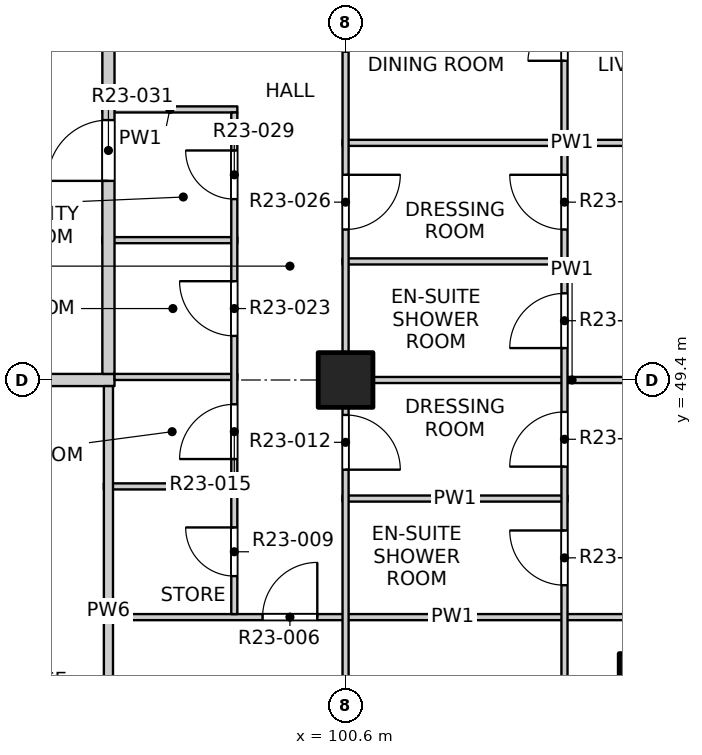
"""IFC4 building model, lengths in metres.
Left out: names, types, materials, properties, quantities, classifications, styles, units other than length and angle.
Written with IfcOpenShell. Run it as: python <this file> out.ifc"""

import sys

from ifc_helpers import new_model, si_unit, direction, frame, frame_2d, origin, origin_2d, place, context, subcontext, project, spatial, rectangle, extrude, element, fill, save


model = new_model("IFC4")
c1 = context("Model", 3, precision=1e-05, world=origin(), true_north=direction((0.0, 1.0)))
c2 = subcontext(c1, "Body", "Model", "MODEL_VIEW")
j1 = project(units=[si_unit("LENGTHUNIT", "METRE"), si_unit("PLANEANGLEUNIT", "RADIAN")], contexts=[c1])
p1 = place(None, origin())
s1 = spatial("IfcSite", under=j1, at=p1, CompositionType="ELEMENT")
p2 = place(p1, origin())
s2 = spatial("IfcBuilding", under=s1, at=p2, CompositionType="ELEMENT")
p3 = place(p2, frame((0.0, 0.0, 238.1)))
s3 = spatial("IfcBuildingStorey", under=s2, at=p3, CompositionType="ELEMENT", Elevation=238.1)
p4 = place(p3, frame((105.5, 44.5, -0.25), z_axis=(0.0, 0.0, 1.0), x_axis=(1.0, 0.0, 0.0)))
e1 = element("IfcColumn", 1, at=p4, inside=s3, PredefinedType="COLUMN", context=c2, shape_type="SweptSolid", body=[
    extrude(rectangle(XDim=0.8, YDim=0.8, at=origin_2d()), origin(), (0.0, 0.0, 1.0), 3.35),
])
p5 = place(p3, frame((100.6, 49.4, -0.25), z_axis=(0.0, 0.0, 1.0), x_axis=(1.0, 0.0, 0.0)))
e2 = element("IfcColumn", 2, at=p5, inside=s3, PredefinedType="COLUMN", context=c2, shape_type="SweptSolid", body=[
    extrude(rectangle(XDim=0.9, YDim=0.9, at=origin_2d()), origin(), (0.0, 0.0, 1.0), 3.35),
])
p6 = place(p3, frame((96.625, 45.5, 0.0), z_axis=(0.0, 0.0, 1.0), x_axis=(1.0, 0.0, 0.0)))
e3 = element("IfcWall", 3, at=p6, inside=s3, PredefinedType="PARTITIONING", context=c2, shape_type="SweptSolid", body=[
    extrude(rectangle(XDim=11.475, YDim=0.1, at=frame_2d((5.738, 0.0))), origin(), (0.0, 0.0, 1.0), 3.1),
])
p7 = place(p6, frame((2.61, 0.0, 0.0)))
e4 = element("IfcOpeningElement", 4, at=p7, cuts=e3, PredefinedType="OPENING", context=c2, shape_type="SweptSolid", body=[
    extrude(rectangle(XDim=0.9, YDim=2.1, at=frame_2d((0.45, 1.05))), frame((0.0, 0.06, 0.0), z_axis=(0.0, -1.0, 0.0), x_axis=(1.0, 0.0, 0.0)), (0.0, 0.0, 1.0), 0.12),
])
p8 = place(p3, frame((100.55, 47.45, 0.0), z_axis=(0.0, 0.0, 1.0), x_axis=(1.0, 0.0, 0.0)))
e5 = element("IfcWall", 5, at=p8, inside=s3, PredefinedType="PARTITIONING", context=c2, shape_type="SweptSolid", body=[
    extrude(rectangle(XDim=3.7, YDim=0.1, at=frame_2d((1.85, 0.0))), origin(), (0.0, 0.0, 1.0), 3.1),
])
p9 = place(p3, frame((96.625, 47.65, 0.0), z_axis=(0.0, 0.0, 1.0), x_axis=(1.0, 0.0, 0.0)))
e6 = element("IfcWall", 6, at=p9, inside=s3, PredefinedType="PARTITIONING", context=c2, shape_type="SweptSolid", body=[
    extrude(rectangle(XDim=2.195, YDim=0.1, at=frame_2d((1.098, 0.0))), origin(), (0.0, 0.0, 1.0), 3.1),
])
p10 = place(p3, frame((73.2, 49.4, 0.0), z_axis=(0.0, 0.0, 1.0), x_axis=(1.0, 0.0, 0.0)))
e7 = element("IfcWall", 7, at=p10, inside=s3, PredefinedType="PARTITIONING", context=c2, shape_type="SweptSolid", body=[
    extrude(rectangle(XDim=23.6, YDim=0.2, at=frame_2d((11.8, 0.0))), origin(), (0.0, 0.0, 1.0), 3.1),
])
p11 = place(p10, frame((2.25, 0.0, 0.0)))
e8 = element("IfcOpeningElement", 8, at=p11, cuts=e7, PredefinedType="OPENING", context=c2, shape_type="SweptSolid", body=[
    extrude(rectangle(XDim=1.2, YDim=2.1, at=frame_2d((0.6, 1.05))), frame((0.0, 0.11, 0.0), z_axis=(0.0, -1.0, 0.0), x_axis=(1.0, 0.0, 0.0)), (0.0, 0.0, 1.0), 0.22),
])
p12 = place(p10, frame((9.4, 0.0, 0.0)))
e9 = element("IfcOpeningElement", 9, at=p12, cuts=e7, PredefinedType="OPENING", context=c2, shape_type="SweptSolid", body=[
    extrude(rectangle(XDim=0.9, YDim=2.1, at=frame_2d((0.45, 1.05))), frame((0.0, 0.11, 0.0), z_axis=(0.0, -1.0, 0.0), x_axis=(1.0, 0.0, 0.0)), (0.0, 0.0, 1.0), 0.22),
])
p13 = place(p10, frame((15.1, 0.0, 0.0)))
e10 = element("IfcOpeningElement", 10, at=p13, cuts=e7, PredefinedType="OPENING", context=c2, shape_type="SweptSolid", body=[
    extrude(rectangle(XDim=1.2, YDim=2.1, at=frame_2d((0.6, 1.05))), frame((0.0, 0.11, 0.0), z_axis=(0.0, -1.0, 0.0), x_axis=(1.0, 0.0, 0.0)), (0.0, 0.0, 1.0), 0.22),
])
p14 = place(p10, frame((21.1, 0.0, 0.0)))
e11 = element("IfcOpeningElement", 11, at=p14, cuts=e7, PredefinedType="OPENING", context=c2, shape_type="SweptSolid", body=[
    extrude(rectangle(XDim=0.9, YDim=2.1, at=frame_2d((0.45, 1.05))), frame((0.0, 0.11, 0.0), z_axis=(0.0, -1.0, 0.0), x_axis=(1.0, 0.0, 0.0)), (0.0, 0.0, 1.0), 0.22),
])
p15 = place(p3, frame((100.55, 49.4, 0.0), z_axis=(0.0, 0.0, 1.0), x_axis=(1.0, 0.0, 0.0)))
e12 = element("IfcWall", 12, at=p15, inside=s3, PredefinedType="PARTITIONING", context=c2, shape_type="SweptSolid", body=[
    extrude(rectangle(XDim=7.55, YDim=0.1, at=frame_2d((3.775, 0.0))), origin(), (0.0, 0.0, 1.0), 3.1),
])
p16 = place(p3, frame((96.8, 49.45, 0.0), z_axis=(0.0, 0.0, 1.0), x_axis=(1.0, 0.0, 0.0)))
e13 = element("IfcWall", 13, at=p16, inside=s3, PredefinedType="PARTITIONING", context=c2, shape_type="SweptSolid", body=[
    extrude(rectangle(XDim=2.02, YDim=0.1, at=frame_2d((1.01, 0.0))), origin(), (0.0, 0.0, 1.0), 3.1),
])
p17 = place(p3, frame((100.55, 51.35, 0.0), z_axis=(0.0, 0.0, 1.0), x_axis=(1.0, 0.0, 0.0)))
e14 = element("IfcWall", 14, at=p17, inside=s3, PredefinedType="PARTITIONING", context=c2, shape_type="SweptSolid", body=[
    extrude(rectangle(XDim=3.7, YDim=0.1, at=frame_2d((1.85, 0.0))), origin(), (0.0, 0.0, 1.0), 3.1),
])
p18 = place(p3, frame((96.6, 51.7, 0.0), z_axis=(0.0, 0.0, 1.0), x_axis=(1.0, 0.0, 0.0)))
e15 = element("IfcWall", 15, at=p18, inside=s3, PredefinedType="PARTITIONING", context=c2, shape_type="SweptSolid", body=[
    extrude(rectangle(XDim=2.22, YDim=0.1, at=frame_2d((1.11, 0.0))), origin(), (0.0, 0.0, 1.0), 3.1),
])
p19 = place(p3, frame((100.55, 53.3, 0.0), z_axis=(0.0, 0.0, 1.0), x_axis=(1.0, 0.0, 0.0)))
e16 = element("IfcWall", 16, at=p19, inside=s3, PredefinedType="PARTITIONING", context=c2, shape_type="SweptSolid", body=[
    extrude(rectangle(XDim=7.55, YDim=0.1, at=frame_2d((3.775, 0.0))), origin(), (0.0, 0.0, 1.0), 3.1),
])
p20 = place(p3, frame((96.6, 53.85, 0.0), z_axis=(0.0, 0.0, 1.0), x_axis=(1.0, 0.0, 0.0)))
e17 = element("IfcWall", 17, at=p20, inside=s3, PredefinedType="PARTITIONING", context=c2, shape_type="SweptSolid", body=[
    extrude(rectangle(XDim=2.22, YDim=0.1, at=frame_2d((1.11, 0.0))), origin(), (0.0, 0.0, 1.0), 3.1),
])
p21 = place(p3, frame((96.7, 41.9, 0.0), z_axis=(0.0, 0.0, 1.0), x_axis=(0.0, 1.0, 0.0)))
e18 = element("IfcWall", 18, at=p21, inside=s3, PredefinedType="PARTITIONING", context=c2, shape_type="SweptSolid", body=[
    extrude(rectangle(XDim=7.4, YDim=0.15, at=frame_2d((3.7, 0.0))), origin(), (0.0, 0.0, 1.0), 3.1),
])
p22 = place(p3, frame((96.7, 49.5, 0.0), z_axis=(0.0, 0.0, 1.0), x_axis=(0.0, 1.0, 0.0)))
e19 = element("IfcWall", 19, at=p22, inside=s3, PredefinedType="PARTITIONING", context=c2, shape_type="SweptSolid", body=[
    extrude(rectangle(XDim=34.9, YDim=0.2, at=frame_2d((17.45, 0.0))), origin(), (0.0, 0.0, 1.0), 3.1),
])
p23 = place(p22, frame((3.175, 0.0, 0.0)))
e20 = element("IfcOpeningElement", 20, at=p23, cuts=e19, PredefinedType="OPENING", context=c2, shape_type="SweptSolid", body=[
    extrude(rectangle(XDim=1.0, YDim=2.1, at=frame_2d((0.5, 1.05))), frame((0.0, 0.11, 0.0), z_axis=(0.0, -1.0, 0.0), x_axis=(1.0, 0.0, 0.0)), (0.0, 0.0, 1.0), 0.22),
])
p24 = place(p22, frame((14.625, 0.0, 0.0)))
e21 = element("IfcOpeningElement", 21, at=p24, cuts=e19, PredefinedType="OPENING", context=c2, shape_type="SweptSolid", body=[
    extrude(rectangle(XDim=1.0, YDim=2.1, at=frame_2d((0.5, 1.05))), frame((0.0, 0.11, 0.0), z_axis=(0.0, -1.0, 0.0), x_axis=(1.0, 0.0, 0.0)), (0.0, 0.0, 1.0), 0.22),
])
p25 = place(p22, frame((30.175, 0.0, 0.0)))
e22 = element("IfcOpeningElement", 22, at=p25, cuts=e19, PredefinedType="OPENING", context=c2, shape_type="SweptSolid", body=[
    extrude(rectangle(XDim=1.0, YDim=2.1, at=frame_2d((0.5, 1.05))), frame((0.0, 0.11, 0.0), z_axis=(0.0, -1.0, 0.0), x_axis=(1.0, 0.0, 0.0)), (0.0, 0.0, 1.0), 0.22),
])
p26 = place(p3, frame((98.77, 45.55, 0.0), z_axis=(0.0, 0.0, 1.0), x_axis=(0.0, 1.0, 0.0)))
e23 = element("IfcWall", 23, at=p26, inside=s3, PredefinedType="PARTITIONING", context=c2, shape_type="SweptSolid", body=[
    extrude(rectangle(XDim=8.25, YDim=0.1, at=frame_2d((4.125, 0.0))), origin(), (0.0, 0.0, 1.0), 3.1),
])
p27 = place(p26, frame((0.625, 0.0, 0.0)))
e24 = element("IfcOpeningElement", 24, at=p27, cuts=e23, PredefinedType="OPENING", context=c2, shape_type="SweptSolid", body=[
    extrude(rectangle(XDim=0.8, YDim=2.1, at=frame_2d((0.4, 1.05))), frame((0.0, 0.06, 0.0), z_axis=(0.0, -1.0, 0.0), x_axis=(1.0, 0.0, 0.0)), (0.0, 0.0, 1.0), 0.12),
])
p28 = place(p26, frame((2.55, 0.0, 0.0)))
e25 = element("IfcOpeningElement", 25, at=p28, cuts=e23, PredefinedType="OPENING", context=c2, shape_type="SweptSolid", body=[
    extrude(rectangle(XDim=0.9, YDim=2.1, at=frame_2d((0.45, 1.05))), frame((0.0, 0.06, 0.0), z_axis=(0.0, -1.0, 0.0), x_axis=(1.0, 0.0, 0.0)), (0.0, 0.0, 1.0), 0.12),
])
p29 = place(p26, frame((4.575, 0.0, 0.0)))
e26 = element("IfcOpeningElement", 26, at=p29, cuts=e23, PredefinedType="OPENING", context=c2, shape_type="SweptSolid", body=[
    extrude(rectangle(XDim=0.9, YDim=2.1, at=frame_2d((0.45, 1.05))), frame((0.0, 0.06, 0.0), z_axis=(0.0, -1.0, 0.0), x_axis=(1.0, 0.0, 0.0)), (0.0, 0.0, 1.0), 0.12),
])
p30 = place(p26, frame((6.825, 0.0, 0.0)))
e27 = element("IfcOpeningElement", 27, at=p30, cuts=e23, PredefinedType="OPENING", context=c2, shape_type="SweptSolid", body=[
    extrude(rectangle(XDim=0.8, YDim=2.1, at=frame_2d((0.4, 1.05))), frame((0.0, 0.06, 0.0), z_axis=(0.0, -1.0, 0.0), x_axis=(1.0, 0.0, 0.0)), (0.0, 0.0, 1.0), 0.12),
])
p31 = place(p3, frame((100.6, 41.9, 0.0), z_axis=(0.0, 0.0, 1.0), x_axis=(0.0, 1.0, 0.0)))
e28 = element("IfcWall", 28, at=p31, inside=s3, PredefinedType="PARTITIONING", context=c2, shape_type="SweptSolid", body=[
    extrude(rectangle(XDim=46.2, YDim=0.1, at=frame_2d((23.1, 0.0))), origin(), (0.0, 0.0, 1.0), 3.1),
])
p32 = place(p31, frame((1.2, 0.0, 0.0)))
e29 = element("IfcOpeningElement", 29, at=p32, cuts=e28, PredefinedType="OPENING", context=c2, shape_type="SweptSolid", body=[
    extrude(rectangle(XDim=0.9, YDim=2.1, at=frame_2d((0.45, 1.05))), frame((0.0, 0.06, 0.0), z_axis=(0.0, -1.0, 0.0), x_axis=(1.0, 0.0, 0.0)), (0.0, 0.0, 1.0), 0.12),
])
p33 = place(p31, frame((6.025, 0.0, 0.0)))
e30 = element("IfcOpeningElement", 30, at=p33, cuts=e28, PredefinedType="OPENING", context=c2, shape_type="SweptSolid", body=[
    extrude(rectangle(XDim=0.9, YDim=2.1, at=frame_2d((0.45, 1.05))), frame((0.0, 0.06, 0.0), z_axis=(0.0, -1.0, 0.0), x_axis=(1.0, 0.0, 0.0)), (0.0, 0.0, 1.0), 0.12),
])
p34 = place(p31, frame((9.975, 0.0, 0.0)))
e31 = element("IfcOpeningElement", 31, at=p34, cuts=e28, PredefinedType="OPENING", context=c2, shape_type="SweptSolid", body=[
    extrude(rectangle(XDim=0.9, YDim=2.1, at=frame_2d((0.45, 1.05))), frame((0.0, 0.06, 0.0), z_axis=(0.0, -1.0, 0.0), x_axis=(1.0, 0.0, 0.0)), (0.0, 0.0, 1.0), 0.12),
])
p35 = place(p31, frame((12.9, 0.0, 0.0)))
e32 = element("IfcOpeningElement", 32, at=p35, cuts=e28, PredefinedType="OPENING", context=c2, shape_type="SweptSolid", body=[
    extrude(rectangle(XDim=0.9, YDim=2.1, at=frame_2d((0.45, 1.05))), frame((0.0, 0.06, 0.0), z_axis=(0.0, -1.0, 0.0), x_axis=(1.0, 0.0, 0.0)), (0.0, 0.0, 1.0), 0.12),
])
p36 = place(p31, frame((17.775, 0.0, 0.0)))
e33 = element("IfcOpeningElement", 33, at=p36, cuts=e28, PredefinedType="OPENING", context=c2, shape_type="SweptSolid", body=[
    extrude(rectangle(XDim=0.9, YDim=2.1, at=frame_2d((0.45, 1.05))), frame((0.0, 0.06, 0.0), z_axis=(0.0, -1.0, 0.0), x_axis=(1.0, 0.0, 0.0)), (0.0, 0.0, 1.0), 0.12),
])
p37 = place(p31, frame((21.625, 0.0, 0.0)))
e34 = element("IfcOpeningElement", 34, at=p37, cuts=e28, PredefinedType="OPENING", context=c2, shape_type="SweptSolid", body=[
    extrude(rectangle(XDim=0.9, YDim=2.1, at=frame_2d((0.45, 1.05))), frame((0.0, 0.06, 0.0), z_axis=(0.0, -1.0, 0.0), x_axis=(1.0, 0.0, 0.0)), (0.0, 0.0, 1.0), 0.12),
])
p38 = place(p31, frame((25.575, 0.0, 0.0)))
e35 = element("IfcOpeningElement", 35, at=p38, cuts=e28, PredefinedType="OPENING", context=c2, shape_type="SweptSolid", body=[
    extrude(rectangle(XDim=0.9, YDim=2.1, at=frame_2d((0.45, 1.05))), frame((0.0, 0.06, 0.0), z_axis=(0.0, -1.0, 0.0), x_axis=(1.0, 0.0, 0.0)), (0.0, 0.0, 1.0), 0.12),
])
p39 = place(p31, frame((28.5, 0.0, 0.0)))
e36 = element("IfcOpeningElement", 36, at=p39, cuts=e28, PredefinedType="OPENING", context=c2, shape_type="SweptSolid", body=[
    extrude(rectangle(XDim=0.9, YDim=2.1, at=frame_2d((0.45, 1.05))), frame((0.0, 0.06, 0.0), z_axis=(0.0, -1.0, 0.0), x_axis=(1.0, 0.0, 0.0)), (0.0, 0.0, 1.0), 0.12),
])
p40 = place(p31, frame((33.375, 0.0, 0.0)))
e37 = element("IfcOpeningElement", 37, at=p40, cuts=e28, PredefinedType="OPENING", context=c2, shape_type="SweptSolid", body=[
    extrude(rectangle(XDim=0.9, YDim=2.1, at=frame_2d((0.45, 1.05))), frame((0.0, 0.06, 0.0), z_axis=(0.0, -1.0, 0.0), x_axis=(1.0, 0.0, 0.0)), (0.0, 0.0, 1.0), 0.12),
])
p41 = place(p31, frame((36.3, 0.0, 0.0)))
e38 = element("IfcOpeningElement", 38, at=p41, cuts=e28, PredefinedType="OPENING", context=c2, shape_type="SweptSolid", body=[
    extrude(rectangle(XDim=0.9, YDim=2.1, at=frame_2d((0.45, 1.05))), frame((0.0, 0.06, 0.0), z_axis=(0.0, -1.0, 0.0), x_axis=(1.0, 0.0, 0.0)), (0.0, 0.0, 1.0), 0.12),
])
p42 = place(p31, frame((40.2, 0.0, 0.0)))
e39 = element("IfcOpeningElement", 39, at=p42, cuts=e28, PredefinedType="OPENING", context=c2, shape_type="SweptSolid", body=[
    extrude(rectangle(XDim=0.9, YDim=2.1, at=frame_2d((0.45, 1.05))), frame((0.0, 0.06, 0.0), z_axis=(0.0, -1.0, 0.0), x_axis=(1.0, 0.0, 0.0)), (0.0, 0.0, 1.0), 0.12),
])
p43 = place(p31, frame((44.1, 0.0, 0.0)))
e40 = element("IfcOpeningElement", 40, at=p43, cuts=e28, PredefinedType="OPENING", context=c2, shape_type="SweptSolid", body=[
    extrude(rectangle(XDim=0.9, YDim=2.1, at=frame_2d((0.45, 1.05))), frame((0.0, 0.06, 0.0), z_axis=(0.0, -1.0, 0.0), x_axis=(1.0, 0.0, 0.0)), (0.0, 0.0, 1.0), 0.12),
])
p44 = place(p3, frame((104.2, 41.9, 0.0), z_axis=(0.0, 0.0, 1.0), x_axis=(0.0, 1.0, 0.0)))
e41 = element("IfcWall", 41, at=p44, inside=s3, PredefinedType="PARTITIONING", context=c2, shape_type="SweptSolid", body=[
    extrude(rectangle(XDim=19.1, YDim=0.1, at=frame_2d((9.55, 0.0))), origin(), (0.0, 0.0, 1.0), 3.1),
])
p45 = place(p44, frame((1.05, 0.0, 0.0)))
e42 = element("IfcOpeningElement", 42, at=p45, cuts=e41, PredefinedType="OPENING", context=c2, shape_type="SweptSolid", body=[
    extrude(rectangle(XDim=1.2, YDim=2.1, at=frame_2d((0.6, 1.05))), frame((0.0, 0.06, 0.0), z_axis=(0.0, -1.0, 0.0), x_axis=(1.0, 0.0, 0.0)), (0.0, 0.0, 1.0), 0.12),
])
p46 = place(p44, frame((4.125, 0.0, 0.0)))
e43 = element("IfcOpeningElement", 43, at=p46, cuts=e41, PredefinedType="OPENING", context=c2, shape_type="SweptSolid", body=[
    extrude(rectangle(XDim=0.9, YDim=2.1, at=frame_2d((0.45, 1.05))), frame((0.0, 0.06, 0.0), z_axis=(0.0, -1.0, 0.0), x_axis=(1.0, 0.0, 0.0)), (0.0, 0.0, 1.0), 0.12),
])
p47 = place(p44, frame((6.075, 0.0, 0.0)))
e44 = element("IfcOpeningElement", 44, at=p47, cuts=e41, PredefinedType="OPENING", context=c2, shape_type="SweptSolid", body=[
    extrude(rectangle(XDim=0.9, YDim=2.1, at=frame_2d((0.45, 1.05))), frame((0.0, 0.06, 0.0), z_axis=(0.0, -1.0, 0.0), x_axis=(1.0, 0.0, 0.0)), (0.0, 0.0, 1.0), 0.12),
])
p48 = place(p44, frame((8.025, 0.0, 0.0)))
e45 = element("IfcOpeningElement", 45, at=p48, cuts=e41, PredefinedType="OPENING", context=c2, shape_type="SweptSolid", body=[
    extrude(rectangle(XDim=0.9, YDim=2.1, at=frame_2d((0.45, 1.05))), frame((0.0, 0.06, 0.0), z_axis=(0.0, -1.0, 0.0), x_axis=(1.0, 0.0, 0.0)), (0.0, 0.0, 1.0), 0.12),
])
p49 = place(p44, frame((9.975, 0.0, 0.0)))
e46 = element("IfcOpeningElement", 46, at=p49, cuts=e41, PredefinedType="OPENING", context=c2, shape_type="SweptSolid", body=[
    extrude(rectangle(XDim=0.9, YDim=2.1, at=frame_2d((0.45, 1.05))), frame((0.0, 0.06, 0.0), z_axis=(0.0, -1.0, 0.0), x_axis=(1.0, 0.0, 0.0)), (0.0, 0.0, 1.0), 0.12),
])
p50 = place(p44, frame((12.75, 0.0, 0.0)))
e47 = element("IfcOpeningElement", 47, at=p50, cuts=e41, PredefinedType="OPENING", context=c2, shape_type="SweptSolid", body=[
    extrude(rectangle(XDim=1.2, YDim=2.1, at=frame_2d((0.6, 1.05))), frame((0.0, 0.06, 0.0), z_axis=(0.0, -1.0, 0.0), x_axis=(1.0, 0.0, 0.0)), (0.0, 0.0, 1.0), 0.12),
])
p51 = place(p44, frame((15.825, 0.0, 0.0)))
e48 = element("IfcOpeningElement", 48, at=p51, cuts=e41, PredefinedType="OPENING", context=c2, shape_type="SweptSolid", body=[
    extrude(rectangle(XDim=0.9, YDim=2.1, at=frame_2d((0.45, 1.05))), frame((0.0, 0.06, 0.0), z_axis=(0.0, -1.0, 0.0), x_axis=(1.0, 0.0, 0.0)), (0.0, 0.0, 1.0), 0.12),
])
p52 = place(p44, frame((17.775, 0.0, 0.0)))
e49 = element("IfcOpeningElement", 49, at=p52, cuts=e41, PredefinedType="OPENING", context=c2, shape_type="SweptSolid", body=[
    extrude(rectangle(XDim=0.9, YDim=2.1, at=frame_2d((0.45, 1.05))), frame((0.0, 0.06, 0.0), z_axis=(0.0, -1.0, 0.0), x_axis=(1.0, 0.0, 0.0)), (0.0, 0.0, 1.0), 0.12),
])
p53 = place(p7, origin())
e50 = element("IfcDoor", 50, at=p53, inside=s3, OperationType="SINGLE_SWING_RIGHT", PredefinedType="DOOR", context=c2, shape_type="SweptSolid", body=[
    extrude(rectangle(XDim=0.9, YDim=2.1, at=frame_2d((0.45, 1.05))), frame((0.0, 0.025, 0.0), z_axis=(0.0, -1.0, 0.0), x_axis=(1.0, 0.0, 0.0)), (0.0, 0.0, 1.0), 0.05),
])
fill(e4, e50)
p54 = place(p46, origin())
e51 = element("IfcDoor", 51, at=p54, inside=s3, OperationType="SINGLE_SWING_RIGHT", PredefinedType="DOOR", context=c2, shape_type="SweptSolid", body=[
    extrude(rectangle(XDim=0.9, YDim=2.1, at=frame_2d((0.45, 1.05))), frame((0.0, 0.025, 0.0), z_axis=(0.0, -1.0, 0.0), x_axis=(1.0, 0.0, 0.0)), (0.0, 0.0, 1.0), 0.05),
])
fill(e43, e51)
p55 = place(p27, origin())
e52 = element("IfcDoor", 52, at=p55, inside=s3, OperationType="SINGLE_SWING_RIGHT", PredefinedType="DOOR", context=c2, shape_type="SweptSolid", body=[
    extrude(rectangle(XDim=0.8, YDim=2.1, at=frame_2d((0.4, 1.05))), frame((0.0, 0.025, 0.0), z_axis=(0.0, -1.0, 0.0), x_axis=(1.0, 0.0, 0.0)), (0.0, 0.0, 1.0), 0.05),
])
fill(e24, e52)
p56 = place(p33, origin())
e53 = element("IfcDoor", 53, at=p56, inside=s3, OperationType="SINGLE_SWING_RIGHT", PredefinedType="DOOR", context=c2, shape_type="SweptSolid", body=[
    extrude(rectangle(XDim=0.9, YDim=2.1, at=frame_2d((0.45, 1.05))), frame((0.0, 0.025, 0.0), z_axis=(0.0, -1.0, 0.0), x_axis=(1.0, 0.0, 0.0)), (0.0, 0.0, 1.0), 0.05),
])
fill(e30, e53)
p57 = place(p47, origin())
e54 = element("IfcDoor", 54, at=p57, inside=s3, OperationType="SINGLE_SWING_LEFT", PredefinedType="DOOR", context=c2, shape_type="SweptSolid", body=[
    extrude(rectangle(XDim=0.9, YDim=2.1, at=frame_2d((0.45, 1.05))), frame((0.0, 0.025, 0.0), z_axis=(0.0, -1.0, 0.0), x_axis=(1.0, 0.0, 0.0)), (0.0, 0.0, 1.0), 0.05),
])
fill(e44, e54)
p58 = place(p28, origin())
e55 = element("IfcDoor", 55, at=p58, inside=s3, OperationType="SINGLE_SWING_LEFT", PredefinedType="DOOR", context=c2, shape_type="SweptSolid", body=[
    extrude(rectangle(XDim=0.9, YDim=2.1, at=frame_2d((0.45, 1.05))), frame((0.0, 0.025, 0.0), z_axis=(0.0, -1.0, 0.0), x_axis=(1.0, 0.0, 0.0)), (0.0, 0.0, 1.0), 0.05),
])
fill(e25, e55)
p59 = place(p48, origin())
e56 = element("IfcDoor", 56, at=p59, inside=s3, OperationType="SINGLE_SWING_LEFT", PredefinedType="DOOR", context=c2, shape_type="SweptSolid", body=[
    extrude(rectangle(XDim=0.9, YDim=2.1, at=frame_2d((0.45, 1.05))), frame((0.0, 0.025, 0.0), z_axis=(0.0, -1.0, 0.0), x_axis=(1.0, 0.0, 0.0)), (0.0, 0.0, 1.0), 0.05),
])
fill(e45, e56)
p60 = place(p29, origin())
e57 = element("IfcDoor", 57, at=p60, inside=s3, OperationType="SINGLE_SWING_RIGHT", PredefinedType="DOOR", context=c2, shape_type="SweptSolid", body=[
    extrude(rectangle(XDim=0.9, YDim=2.1, at=frame_2d((0.45, 1.05))), frame((0.0, 0.025, 0.0), z_axis=(0.0, -1.0, 0.0), x_axis=(1.0, 0.0, 0.0)), (0.0, 0.0, 1.0), 0.05),
])
fill(e26, e57)
p61 = place(p34, origin())
e58 = element("IfcDoor", 58, at=p61, inside=s3, OperationType="SINGLE_SWING_LEFT", PredefinedType="DOOR", context=c2, shape_type="SweptSolid", body=[
    extrude(rectangle(XDim=0.9, YDim=2.1, at=frame_2d((0.45, 1.05))), frame((0.0, 0.025, 0.0), z_axis=(0.0, -1.0, 0.0), x_axis=(1.0, 0.0, 0.0)), (0.0, 0.0, 1.0), 0.05),
])
fill(e31, e58)
p62 = place(p49, origin())
e59 = element("IfcDoor", 59, at=p62, inside=s3, OperationType="SINGLE_SWING_RIGHT", PredefinedType="DOOR", context=c2, shape_type="SweptSolid", body=[
    extrude(rectangle(XDim=0.9, YDim=2.1, at=frame_2d((0.45, 1.05))), frame((0.0, 0.025, 0.0), z_axis=(0.0, -1.0, 0.0), x_axis=(1.0, 0.0, 0.0)), (0.0, 0.0, 1.0), 0.05),
])
fill(e46, e59)
p63 = place(p30, origin())
e60 = element("IfcDoor", 60, at=p63, inside=s3, OperationType="SINGLE_SWING_RIGHT", PredefinedType="DOOR", context=c2, shape_type="SweptSolid", body=[
    extrude(rectangle(XDim=0.8, YDim=2.1, at=frame_2d((0.4, 1.05))), frame((0.0, 0.025, 0.0), z_axis=(0.0, -1.0, 0.0), x_axis=(1.0, 0.0, 0.0)), (0.0, 0.0, 1.0), 0.05),
])
fill(e27, e60)
p64 = place(p23, origin())
e61 = element("IfcDoor", 61, at=p64, inside=s3, OperationType="SINGLE_SWING_RIGHT", PredefinedType="DOOR", context=c2, shape_type="SweptSolid", body=[
    extrude(rectangle(XDim=1.0, YDim=2.1, at=frame_2d((0.5, 1.05))), frame((0.0, 0.025, 0.0), z_axis=(0.0, -1.0, 0.0), x_axis=(1.0, 0.0, 0.0)), (0.0, 0.0, 1.0), 0.05),
])
fill(e20, e61)
p65 = place(p50, origin())
e62 = element("IfcDoor", 62, at=p65, inside=s3, OperationType="DOUBLE_DOOR_SINGLE_SWING", PredefinedType="DOOR", context=c2, shape_type="SweptSolid", body=[
    extrude(rectangle(XDim=1.2, YDim=2.1, at=frame_2d((0.6, 1.05))), frame((0.0, 0.025, 0.0), z_axis=(0.0, -1.0, 0.0), x_axis=(1.0, 0.0, 0.0)), (0.0, 0.0, 1.0), 0.05),
])
fill(e47, e62)
save(model, sys.argv[1])
